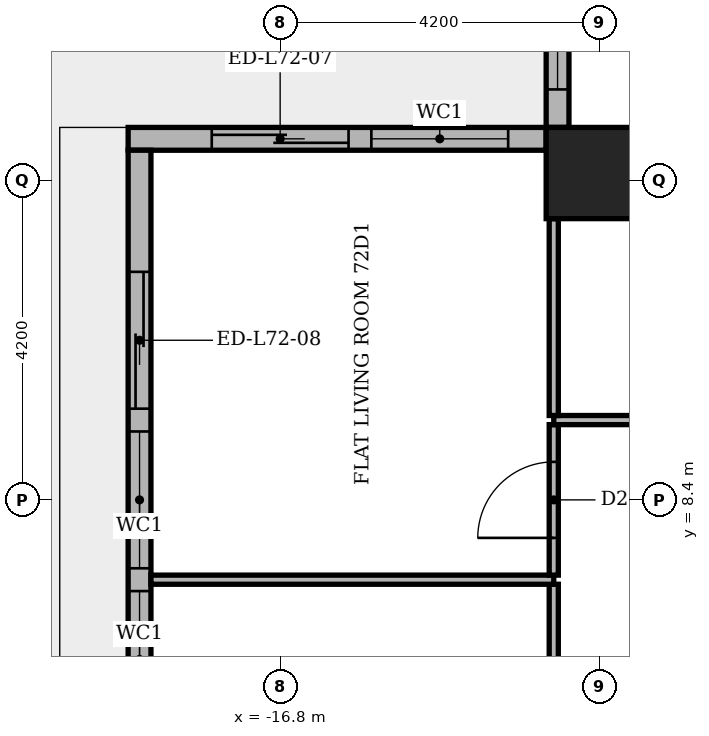
"""IFC4 building model, lengths in metres.
Left out: names, types, materials, properties, quantities, classifications, styles, units other than length and angle.
Written with IfcOpenShell. Run it as: python <this file> out.ifc"""

import sys

from ifc_helpers import new_model, si_unit, direction, frame, frame_2d, origin, origin_2d, place, context, subcontext, project, spatial, rectangle, extrude, element, fill, save


model = new_model("IFC4")
c1 = context("Model", 3, precision=1e-05, world=origin(), true_north=direction((0.0, 1.0)))
c2 = subcontext(c1, "Body", "Model", "MODEL_VIEW")
j1 = project(units=[si_unit("LENGTHUNIT", "METRE"), si_unit("PLANEANGLEUNIT", "RADIAN")], contexts=[c1])
p1 = place(None, origin())
s1 = spatial("IfcSite", under=j1, at=p1, CompositionType="ELEMENT")
p2 = place(p1, origin())
s2 = spatial("IfcBuilding", under=s1, at=p2, CompositionType="ELEMENT")
p3 = place(p2, frame((0.0, 0.0, 300.6)))
s3 = spatial("IfcBuildingStorey", under=s2, at=p3, CompositionType="ELEMENT", Elevation=300.6)
p4 = place(p3, frame((-12.7, 12.7, -0.35), z_axis=(0.0, 0.0, 1.0), x_axis=(1.0, 0.0, 0.0)))
e1 = element("IfcColumn", 1, at=p4, inside=s3, PredefinedType="COLUMN", context=c2, shape_type="SweptSolid", body=[
    extrude(rectangle(XDim=1.2, YDim=1.2, at=origin_2d()), origin(), (0.0, 0.0, 1.0), 4.25),
])
p5 = place(p3, frame((-13.15, 18.5, 0.0), z_axis=(0.0, 0.0, 1.0), x_axis=(0.0, -1.0, 0.0)))
e2 = element("IfcWall", 2, at=p5, inside=s3, PredefinedType="STANDARD", context=c2, shape_type="SweptSolid", body=[
    extrude(rectangle(XDim=5.2, YDim=0.3, at=frame_2d((2.6, 0.0))), origin(), (0.0, 0.0, 1.0), 3.55),
])
p6 = place(p5, frame((0.8, 0.0, 0.6)))
e3 = element("IfcOpeningElement", 3, at=p6, cuts=e2, PredefinedType="OPENING", context=c2, shape_type="SweptSolid", body=[
    extrude(rectangle(XDim=3.9, YDim=2.4, at=frame_2d((1.95, 1.2))), frame((0.0, 0.16, 0.0), z_axis=(0.0, -1.0, 0.0), x_axis=(1.0, 0.0, 0.0)), (0.0, 0.0, 1.0), 0.32),
])
p7 = place(p3, frame((-13.3, 13.15, 0.0), z_axis=(0.0, 0.0, 1.0), x_axis=(-1.0, 0.0, 0.0)))
e4 = element("IfcWall", 4, at=p7, inside=s3, PredefinedType="STANDARD", context=c2, shape_type="SweptSolid", body=[
    extrude(rectangle(XDim=5.5, YDim=0.3, at=frame_2d((2.75, 0.0))), origin(), (0.0, 0.0, 1.0), 3.55),
])
p8 = place(p7, frame((0.5, 0.0, 0.6)))
e5 = element("IfcOpeningElement", 5, at=p8, cuts=e4, PredefinedType="OPENING", context=c2, shape_type="SweptSolid", body=[
    extrude(rectangle(XDim=1.8, YDim=2.4, at=frame_2d((0.9, 1.2))), frame((0.0, 0.16, 0.0), z_axis=(0.0, -1.0, 0.0), x_axis=(1.0, 0.0, 0.0)), (0.0, 0.0, 1.0), 0.32),
])
p9 = place(p7, frame((2.6, 0.0, 0.0)))
e6 = element("IfcOpeningElement", 6, at=p9, cuts=e4, PredefinedType="OPENING", context=c2, shape_type="SweptSolid", body=[
    extrude(rectangle(XDim=1.8, YDim=2.4, at=frame_2d((0.9, 1.2))), frame((0.0, 0.16, 0.0), z_axis=(0.0, -1.0, 0.0), x_axis=(1.0, 0.0, 0.0)), (0.0, 0.0, 1.0), 0.32),
])
p10 = place(p3, frame((-18.65, 13.0, 0.0), z_axis=(0.0, 0.0, 1.0), x_axis=(0.0, -1.0, 0.0)))
e7 = element("IfcWall", 7, at=p10, inside=s3, PredefinedType="STANDARD", context=c2, shape_type="SweptSolid", body=[
    extrude(rectangle(XDim=26.3, YDim=0.3, at=frame_2d((13.15, 0.0))), origin(), (0.0, 0.0, 1.0), 3.55),
])
p11 = place(p10, frame((1.6, 0.0, 0.0)))
e8 = element("IfcOpeningElement", 8, at=p11, cuts=e7, PredefinedType="OPENING", context=c2, shape_type="SweptSolid", body=[
    extrude(rectangle(XDim=1.8, YDim=2.4, at=frame_2d((0.9, 1.2))), frame((0.0, 0.16, 0.0), z_axis=(0.0, -1.0, 0.0), x_axis=(1.0, 0.0, 0.0)), (0.0, 0.0, 1.0), 0.32),
])
p12 = place(p10, frame((3.7, 0.0, 0.6)))
e9 = element("IfcOpeningElement", 9, at=p12, cuts=e7, PredefinedType="OPENING", context=c2, shape_type="SweptSolid", body=[
    extrude(rectangle(XDim=1.8, YDim=2.4, at=frame_2d((0.9, 1.2))), frame((0.0, 0.16, 0.0), z_axis=(0.0, -1.0, 0.0), x_axis=(1.0, 0.0, 0.0)), (0.0, 0.0, 1.0), 0.32),
])
p13 = place(p10, frame((5.8, 0.0, 0.6)))
e10 = element("IfcOpeningElement", 10, at=p13, cuts=e7, PredefinedType="OPENING", context=c2, shape_type="SweptSolid", body=[
    extrude(rectangle(XDim=1.8, YDim=2.4, at=frame_2d((0.9, 1.2))), frame((0.0, 0.16, 0.0), z_axis=(0.0, -1.0, 0.0), x_axis=(1.0, 0.0, 0.0)), (0.0, 0.0, 1.0), 0.32),
])
p14 = place(p10, frame((7.9, 0.0, 0.0)))
e11 = element("IfcOpeningElement", 11, at=p14, cuts=e7, PredefinedType="OPENING", context=c2, shape_type="SweptSolid", body=[
    extrude(rectangle(XDim=1.8, YDim=2.4, at=frame_2d((0.9, 1.2))), frame((0.0, 0.16, 0.0), z_axis=(0.0, -1.0, 0.0), x_axis=(1.0, 0.0, 0.0)), (0.0, 0.0, 1.0), 0.32),
])
p15 = place(p10, frame((10.0, 0.0, 0.6)))
e12 = element("IfcOpeningElement", 12, at=p15, cuts=e7, PredefinedType="OPENING", context=c2, shape_type="SweptSolid", body=[
    extrude(rectangle(XDim=1.8, YDim=2.4, at=frame_2d((0.9, 1.2))), frame((0.0, 0.16, 0.0), z_axis=(0.0, -1.0, 0.0), x_axis=(1.0, 0.0, 0.0)), (0.0, 0.0, 1.0), 0.32),
])
p16 = place(p10, frame((12.1, 0.0, 0.6)))
e13 = element("IfcOpeningElement", 13, at=p16, cuts=e7, PredefinedType="OPENING", context=c2, shape_type="SweptSolid", body=[
    extrude(rectangle(XDim=1.8, YDim=2.4, at=frame_2d((0.9, 1.2))), frame((0.0, 0.16, 0.0), z_axis=(0.0, -1.0, 0.0), x_axis=(1.0, 0.0, 0.0)), (0.0, 0.0, 1.0), 0.32),
])
p17 = place(p10, frame((14.2, 0.0, 0.6)))
e14 = element("IfcOpeningElement", 14, at=p17, cuts=e7, PredefinedType="OPENING", context=c2, shape_type="SweptSolid", body=[
    extrude(rectangle(XDim=3.9, YDim=2.4, at=frame_2d((1.95, 1.2))), frame((0.0, 0.16, 0.0), z_axis=(0.0, -1.0, 0.0), x_axis=(1.0, 0.0, 0.0)), (0.0, 0.0, 1.0), 0.32),
])
p18 = place(p10, frame((18.4, 0.0, 0.6)))
e15 = element("IfcOpeningElement", 15, at=p18, cuts=e7, PredefinedType="OPENING", context=c2, shape_type="SweptSolid", body=[
    extrude(rectangle(XDim=1.8, YDim=2.4, at=frame_2d((0.9, 1.2))), frame((0.0, 0.16, 0.0), z_axis=(0.0, -1.0, 0.0), x_axis=(1.0, 0.0, 0.0)), (0.0, 0.0, 1.0), 0.32),
])
p19 = place(p10, frame((20.5, 0.0, 0.6)))
e16 = element("IfcOpeningElement", 16, at=p19, cuts=e7, PredefinedType="OPENING", context=c2, shape_type="SweptSolid", body=[
    extrude(rectangle(XDim=3.9, YDim=2.4, at=frame_2d((1.95, 1.2))), frame((0.0, 0.16, 0.0), z_axis=(0.0, -1.0, 0.0), x_axis=(1.0, 0.0, 0.0)), (0.0, 0.0, 1.0), 0.32),
])
p20 = place(p3, frame((-13.2, 3.21, 0.0), z_axis=(0.0, 0.0, 1.0), x_axis=(0.0, 1.0, 0.0)))
e17 = element("IfcWall", 17, at=p20, inside=s3, PredefinedType="PARTITIONING", context=c2, shape_type="SweptSolid", body=[
    extrude(rectangle(XDim=4.08, YDim=0.12, at=frame_2d((2.04, 0.0))), origin(), (0.0, 0.0, 1.0), 3.55),
])
p21 = place(p20, frame((1.59, 0.0, 0.0)))
e18 = element("IfcOpeningElement", 18, at=p21, cuts=e17, PredefinedType="OPENING", context=c2, shape_type="SweptSolid", body=[
    extrude(rectangle(XDim=0.9, YDim=2.1, at=frame_2d((0.45, 1.05))), frame((0.0, 0.07, 0.0), z_axis=(0.0, -1.0, 0.0), x_axis=(1.0, 0.0, 0.0)), (0.0, 0.0, 1.0), 0.14),
])
p22 = place(p3, frame((-18.5, 7.35, 0.0), z_axis=(0.0, 0.0, 1.0), x_axis=(1.0, 0.0, 0.0)))
e19 = element("IfcWall", 19, at=p22, inside=s3, PredefinedType="PARTITIONING", context=c2, shape_type="SweptSolid", body=[
    extrude(rectangle(XDim=5.3, YDim=0.12, at=frame_2d((2.65, 0.0))), origin(), (0.0, 0.0, 1.0), 3.55),
])
p23 = place(p3, frame((-13.2, 7.41, 0.0), z_axis=(0.0, 0.0, 1.0), x_axis=(0.0, 1.0, 0.0)))
e20 = element("IfcWall", 20, at=p23, inside=s3, PredefinedType="PARTITIONING", context=c2, shape_type="SweptSolid", body=[
    extrude(rectangle(XDim=1.98, YDim=0.12, at=frame_2d((0.99, 0.0))), origin(), (0.0, 0.0, 1.0), 3.55),
])
p24 = place(p23, frame((0.49, 0.0, 0.0)))
e21 = element("IfcOpeningElement", 21, at=p24, cuts=e20, PredefinedType="OPENING", context=c2, shape_type="SweptSolid", body=[
    extrude(rectangle(XDim=1.0, YDim=2.1, at=frame_2d((0.5, 1.05))), frame((0.0, 0.07, 0.0), z_axis=(0.0, -1.0, 0.0), x_axis=(1.0, 0.0, 0.0)), (0.0, 0.0, 1.0), 0.14),
])
p25 = place(p3, frame((-13.2, 9.45, 0.0), z_axis=(0.0, 0.0, 1.0), x_axis=(1.0, 0.0, 0.0)))
e22 = element("IfcWall", 22, at=p25, inside=s3, PredefinedType="PARTITIONING", context=c2, shape_type="SweptSolid", body=[
    extrude(rectangle(XDim=5.75, YDim=0.12, at=frame_2d((2.875, 0.0))), origin(), (0.0, 0.0, 1.0), 3.55),
])
p26 = place(p25, frame((2.475, 0.0, 0.0)))
e23 = element("IfcOpeningElement", 23, at=p26, cuts=e22, PredefinedType="OPENING", context=c2, shape_type="SweptSolid", body=[
    extrude(rectangle(XDim=0.9, YDim=2.1, at=frame_2d((0.45, 1.05))), frame((0.0, 0.07, 0.0), z_axis=(0.0, -1.0, 0.0), x_axis=(1.0, 0.0, 0.0)), (0.0, 0.0, 1.0), 0.14),
])
p27 = place(p3, frame((-13.2, 9.51, 0.0), z_axis=(0.0, 0.0, 1.0), x_axis=(0.0, 1.0, 0.0)))
e24 = element("IfcWall", 24, at=p27, inside=s3, PredefinedType="PARTITIONING", context=c2, shape_type="SweptSolid", body=[
    extrude(rectangle(XDim=2.59, YDim=0.12, at=frame_2d((1.295, 0.0))), origin(), (0.0, 0.0, 1.0), 3.55),
])
p28 = place(p6, origin())
e25 = element("IfcWindow", 25, at=p28, inside=s3, PartitioningType="SINGLE_PANEL", PredefinedType="WINDOW", context=c2, shape_type="SweptSolid", body=[
    extrude(rectangle(XDim=3.9, YDim=2.4, at=frame_2d((1.95, 1.2))), frame((0.0, 0.03, 0.0), z_axis=(0.0, -1.0, 0.0), x_axis=(1.0, 0.0, 0.0)), (0.0, 0.0, 1.0), 0.06),
])
fill(e3, e25)
p29 = place(p8, origin())
e26 = element("IfcWindow", 26, at=p29, inside=s3, PartitioningType="SINGLE_PANEL", PredefinedType="WINDOW", context=c2, shape_type="SweptSolid", body=[
    extrude(rectangle(XDim=1.8, YDim=2.4, at=frame_2d((0.9, 1.2))), frame((0.0, 0.03, 0.0), z_axis=(0.0, -1.0, 0.0), x_axis=(1.0, 0.0, 0.0)), (0.0, 0.0, 1.0), 0.06),
])
fill(e5, e26)
p30 = place(p9, origin())
e27 = element("IfcDoor", 27, at=p30, inside=s3, OperationType="SLIDING_TO_LEFT", PredefinedType="DOOR", context=c2, shape_type="SweptSolid", body=[
    extrude(rectangle(XDim=1.8, YDim=2.4, at=frame_2d((0.9, 1.2))), frame((0.0, 0.025, 0.0), z_axis=(0.0, -1.0, 0.0), x_axis=(1.0, 0.0, 0.0)), (0.0, 0.0, 1.0), 0.05),
])
fill(e6, e27)
p31 = place(p11, origin())
e28 = element("IfcDoor", 28, at=p31, inside=s3, OperationType="SLIDING_TO_RIGHT", PredefinedType="DOOR", context=c2, shape_type="SweptSolid", body=[
    extrude(rectangle(XDim=1.8, YDim=2.4, at=frame_2d((0.9, 1.2))), frame((0.0, 0.025, 0.0), z_axis=(0.0, -1.0, 0.0), x_axis=(1.0, 0.0, 0.0)), (0.0, 0.0, 1.0), 0.05),
])
fill(e8, e28)
p32 = place(p12, origin())
e29 = element("IfcWindow", 29, at=p32, inside=s3, PartitioningType="SINGLE_PANEL", PredefinedType="WINDOW", context=c2, shape_type="SweptSolid", body=[
    extrude(rectangle(XDim=1.8, YDim=2.4, at=frame_2d((0.9, 1.2))), frame((0.0, 0.03, 0.0), z_axis=(0.0, -1.0, 0.0), x_axis=(1.0, 0.0, 0.0)), (0.0, 0.0, 1.0), 0.06),
])
fill(e9, e29)
p33 = place(p13, origin())
e30 = element("IfcWindow", 30, at=p33, inside=s3, PartitioningType="SINGLE_PANEL", PredefinedType="WINDOW", context=c2, shape_type="SweptSolid", body=[
    extrude(rectangle(XDim=1.8, YDim=2.4, at=frame_2d((0.9, 1.2))), frame((0.0, 0.03, 0.0), z_axis=(0.0, -1.0, 0.0), x_axis=(1.0, 0.0, 0.0)), (0.0, 0.0, 1.0), 0.06),
])
fill(e10, e30)
p34 = place(p24, origin())
e31 = element("IfcDoor", 31, at=p34, inside=s3, OperationType="SINGLE_SWING_LEFT", PredefinedType="DOOR", context=c2, shape_type="SweptSolid", body=[
    extrude(rectangle(XDim=1.0, YDim=2.1, at=frame_2d((0.5, 1.05))), frame((0.0, 0.025, 0.0), z_axis=(0.0, -1.0, 0.0), x_axis=(1.0, 0.0, 0.0)), (0.0, 0.0, 1.0), 0.05),
])
fill(e21, e31)
save(model, sys.argv[1])
